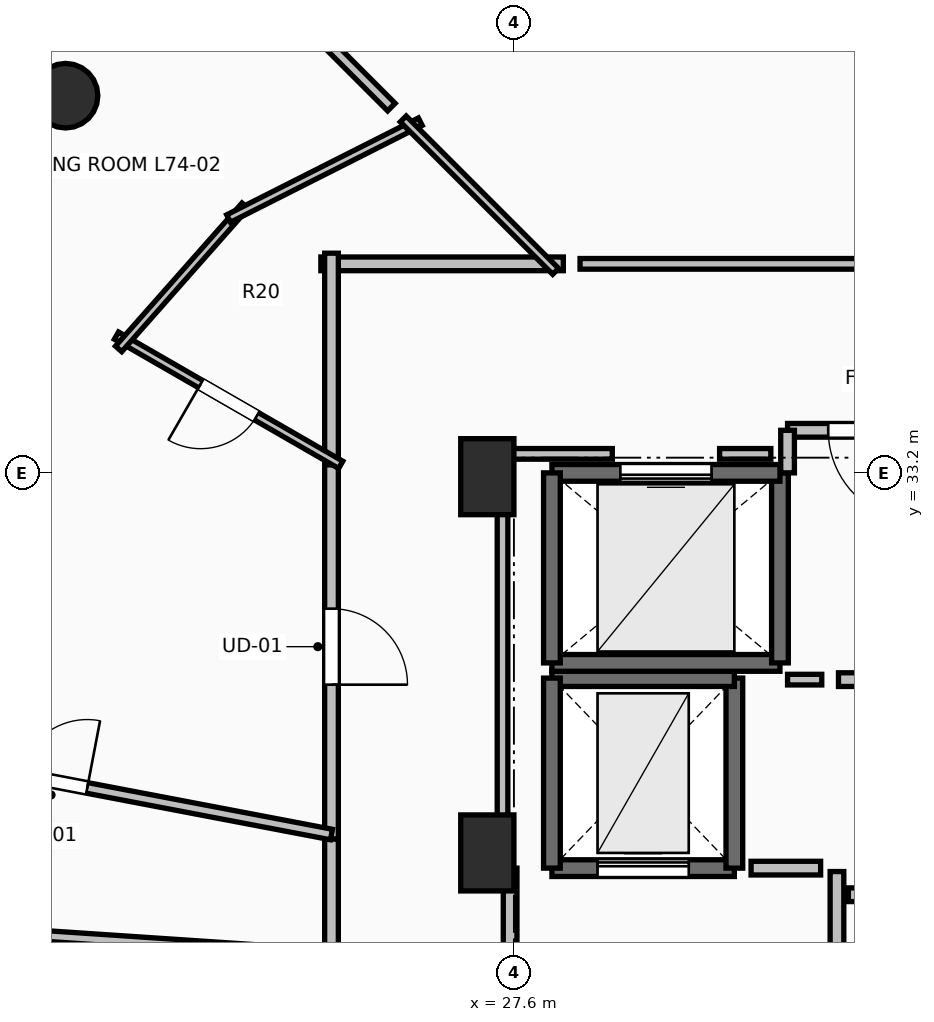
"""IFC4 building model, lengths in metres.
Left out: names, types, materials, properties, quantities, classifications, styles, units other than length and angle.
Written with IfcOpenShell. Run it as: python <this file> out.ifc"""

import sys

from ifc_helpers import new_model, si_unit, direction, frame, frame_2d, origin, origin_2d, place, context, subcontext, project, spatial, rectangle, circle, extrude, element, fill, save


model = new_model("IFC4")
c1 = context("Model", 3, precision=1e-05, world=origin(), true_north=direction((0.0, 1.0)))
c2 = subcontext(c1, "Body", "Model", "MODEL_VIEW")
j1 = project(units=[si_unit("LENGTHUNIT", "METRE"), si_unit("PLANEANGLEUNIT", "RADIAN")], contexts=[c1])
p1 = place(None, origin())
s1 = spatial("IfcSite", under=j1, at=p1, CompositionType="ELEMENT")
p2 = place(p1, origin())
s2 = spatial("IfcBuilding", under=s1, at=p2, CompositionType="ELEMENT")
p3 = place(p2, frame((0.0, 0.0, 273.3)))
s3 = spatial("IfcBuildingStorey", under=s2, at=p3, CompositionType="ELEMENT", Elevation=273.3)
p4 = place(p3, frame((21.701, 38.162, 0.0), z_axis=(0.0, 0.0, 1.0), x_axis=(-0.707106781187, 0.707106781187, 0.0)))
e1 = element("IfcColumn", 1, at=p4, inside=s3, PredefinedType="COLUMN", context=c2, shape_type="SweptSolid", body=[
    extrude(circle(Radius=0.425, at=origin_2d()), origin(), (0.0, 0.0, 1.0), 3.55),
])
for number, where, z_axis, x_axis in (
    (2, (27.25, 28.2, 0.0), (0.0, 0.0, 1.0), (1.0, 0.0, 0.0)),
    (3, (27.25, 33.15, 0.0), (0.0, 0.0, 1.0), (1.0, 0.0, 0.0)),
):
    element("IfcColumn", number, at=place(p3, frame(where, z_axis=z_axis, x_axis=x_axis)), inside=s3, PredefinedType="PILASTER", context=c2, shape_type="SweptSolid", body=[
        extrude(rectangle(XDim=0.7, YDim=1.0, at=origin_2d()), origin(), (0.0, 0.0, 1.0), 3.55),
    ])
p5 = place(p3, frame((28.1, 28.0, 0.0), z_axis=(0.0, 0.0, 1.0), x_axis=(1.0, 0.0, 0.0)))
e4 = element("IfcWall", 4, at=p5, inside=s3, PredefinedType="SHEAR", context=c2, shape_type="SweptSolid", body=[
    extrude(rectangle(XDim=2.4, YDim=0.22, at=frame_2d((1.2, 0.0))), origin(), (0.0, 0.0, 1.0), 3.29),
])
p6 = place(p5, frame((0.6, 0.0, 0.0)))
e5 = element("IfcOpeningElement", 5, at=p6, cuts=e4, PredefinedType="OPENING", context=c2, shape_type="SweptSolid", body=[
    extrude(rectangle(XDim=1.2, YDim=2.2, at=frame_2d((0.6, 1.1))), frame((0.0, 0.125, 0.0), z_axis=(0.0, -1.0, 0.0), x_axis=(1.0, 0.0, 0.0)), (0.0, 0.0, 1.0), 0.25),
])
p7 = place(p3, frame((30.5, 28.0, 0.0), z_axis=(0.0, 0.0, 1.0), x_axis=(0.0, 1.0, 0.0)))
e6 = element("IfcWall", 6, at=p7, inside=s3, PredefinedType="SHEAR", context=c2, shape_type="SweptSolid", body=[
    extrude(rectangle(XDim=2.5, YDim=0.22, at=frame_2d((1.25, 0.0))), origin(), (0.0, 0.0, 1.0), 3.29),
])
p8 = place(p3, frame((30.5, 30.5, 0.0), z_axis=(0.0, 0.0, 1.0), x_axis=(-1.0, 0.0, 0.0)))
e7 = element("IfcWall", 7, at=p8, inside=s3, PredefinedType="SHEAR", context=c2, shape_type="SweptSolid", body=[
    extrude(rectangle(XDim=2.4, YDim=0.22, at=frame_2d((1.2, 0.0))), origin(), (0.0, 0.0, 1.0), 3.29),
])
p9 = place(p3, frame((28.1, 30.5, 0.0), z_axis=(0.0, 0.0, 1.0), x_axis=(0.0, -1.0, 0.0)))
e8 = element("IfcWall", 8, at=p9, inside=s3, PredefinedType="SHEAR", context=c2, shape_type="SweptSolid", body=[
    extrude(rectangle(XDim=2.5, YDim=0.22, at=frame_2d((1.25, 0.0))), origin(), (0.0, 0.0, 1.0), 3.29),
])
p10 = place(p3, frame((28.1, 30.7, 0.0), z_axis=(0.0, 0.0, 1.0), x_axis=(1.0, 0.0, 0.0)))
e9 = element("IfcWall", 9, at=p10, inside=s3, PredefinedType="SOLIDWALL", context=c2, shape_type="SweptSolid", body=[
    extrude(rectangle(XDim=3.0, YDim=0.22, at=frame_2d((1.5, 0.0))), origin(), (0.0, 0.0, 1.0), 3.29),
])
p11 = place(p3, frame((31.1, 30.7, 0.0), z_axis=(0.0, 0.0, 1.0), x_axis=(0.0, 1.0, 0.0)))
e10 = element("IfcWall", 10, at=p11, inside=s3, PredefinedType="SOLIDWALL", context=c2, shape_type="SweptSolid", body=[
    extrude(rectangle(XDim=2.5, YDim=0.22, at=frame_2d((1.25, 0.0))), origin(), (0.0, 0.0, 1.0), 3.29),
])
p12 = place(p3, frame((31.1, 33.2, 0.0), z_axis=(0.0, 0.0, 1.0), x_axis=(-1.0, 0.0, 0.0)))
e11 = element("IfcWall", 11, at=p12, inside=s3, PredefinedType="SOLIDWALL", context=c2, shape_type="SweptSolid", body=[
    extrude(rectangle(XDim=3.0, YDim=0.22, at=frame_2d((1.5, 0.0))), origin(), (0.0, 0.0, 1.0), 3.29),
])
p13 = place(p12, frame((0.9, 0.0, 0.0)))
e12 = element("IfcOpeningElement", 12, at=p13, cuts=e11, PredefinedType="OPENING", context=c2, shape_type="SweptSolid", body=[
    extrude(rectangle(XDim=1.2, YDim=2.2, at=frame_2d((0.6, 1.1))), frame((0.0, 0.125, 0.0), z_axis=(0.0, -1.0, 0.0), x_axis=(1.0, 0.0, 0.0)), (0.0, 0.0, 1.0), 0.25),
])
p14 = place(p3, frame((28.1, 33.2, 0.0), z_axis=(0.0, 0.0, 1.0), x_axis=(0.0, -1.0, 0.0)))
e13 = element("IfcWall", 13, at=p14, inside=s3, PredefinedType="SOLIDWALL", context=c2, shape_type="SweptSolid", body=[
    extrude(rectangle(XDim=2.5, YDim=0.22, at=frame_2d((1.25, 0.0))), origin(), (0.0, 0.0, 1.0), 3.29),
])
p15 = place(p3, frame((31.85, 24.045, 0.0), z_axis=(0.0, 0.0, 1.0), x_axis=(0.0, 1.0, 0.0)))
e14 = element("IfcWall", 14, at=p15, inside=s3, PredefinedType="PARTITIONING", context=c2, shape_type="SweptSolid", body=[
    extrude(rectangle(XDim=3.91, YDim=0.18, at=frame_2d((1.955, 0.0))), origin(), (0.0, 0.0, 1.0), 3.29),
])
p16 = place(p15, frame((1.355, 0.0, 0.0)))
e15 = element("IfcOpeningElement", 15, at=p16, cuts=e14, PredefinedType="OPENING", context=c2, shape_type="SweptSolid", body=[
    extrude(rectangle(XDim=1.2, YDim=2.15, at=frame_2d((0.6, 1.075))), frame((0.0, 0.105, 0.0), z_axis=(0.0, -1.0, 0.0), x_axis=(1.0, 0.0, 0.0)), (0.0, 0.0, 1.0), 0.21),
])
p17 = place(p3, frame((27.55, 28.0, 0.0), z_axis=(0.0, 0.0, 1.0), x_axis=(0.0, -1.0, 0.0)))
e16 = element("IfcWall", 16, at=p17, inside=s3, PredefinedType="PARTITIONING", context=c2, shape_type="SweptSolid", body=[
    extrude(rectangle(XDim=4.05, YDim=0.18, at=frame_2d((2.025, 0.0))), origin(), (0.0, 0.0, 1.0), 3.29),
])
p18 = place(p17, frame((1.425, 0.0, 0.0)))
e17 = element("IfcOpeningElement", 17, at=p18, cuts=e16, PredefinedType="OPENING", context=c2, shape_type="SweptSolid", body=[
    extrude(rectangle(XDim=1.2, YDim=2.15, at=frame_2d((0.6, 1.075))), frame((0.0, 0.105, 0.0), z_axis=(0.0, -1.0, 0.0), x_axis=(1.0, 0.0, 0.0)), (0.0, 0.0, 1.0), 0.21),
])
p19 = place(p3, frame((31.87, 30.48, 0.0), z_axis=(0.0, 0.0, 1.0), x_axis=(1.0, 0.0, 0.0)))
e18 = element("IfcWall", 18, at=p19, inside=s3, PredefinedType="PARTITIONING", context=c2, shape_type="SweptSolid", body=[
    extrude(rectangle(XDim=1.6, YDim=0.18, at=frame_2d((0.8, 0.0))), origin(), (0.0, 0.0, 1.0), 3.29),
])
p20 = place(p3, frame((33.47, 33.76, 0.0), z_axis=(0.0, 0.0, 1.0), x_axis=(-1.0, 0.0, 0.0)))
e19 = element("IfcWall", 19, at=p20, inside=s3, PredefinedType="PARTITIONING", context=c2, shape_type="SweptSolid", body=[
    extrude(rectangle(XDim=2.27, YDim=0.18, at=frame_2d((1.135, 0.0))), origin(), (0.0, 0.0, 1.0), 3.29),
])
p21 = place(p20, frame((0.535, 0.0, 0.0)))
e20 = element("IfcOpeningElement", 20, at=p21, cuts=e19, PredefinedType="OPENING", context=c2, shape_type="SweptSolid", body=[
    extrude(rectangle(XDim=1.2, YDim=2.15, at=frame_2d((0.6, 1.075))), frame((0.0, 0.105, 0.0), z_axis=(0.0, -1.0, 0.0), x_axis=(1.0, 0.0, 0.0)), (0.0, 0.0, 1.0), 0.21),
])
p22 = place(p3, frame((31.2, 33.76, 0.0), z_axis=(0.0, 0.0, 1.0), x_axis=(0.0, -1.0, 0.0)))
e21 = element("IfcWall", 21, at=p22, inside=s3, PredefinedType="PARTITIONING", context=c2, shape_type="SweptSolid", body=[
    extrude(rectangle(XDim=0.56, YDim=0.18, at=frame_2d((0.28, 0.0))), origin(), (0.0, 0.0, 1.0), 3.29),
])
p23 = place(p3, frame((35.04, 27.65, 0.0), z_axis=(0.0, 0.0, 1.0), x_axis=(-1.0, 0.0, 0.0)))
e22 = element("IfcWall", 22, at=p23, inside=s3, PredefinedType="PARTITIONING", context=c2, shape_type="SweptSolid", body=[
    extrude(rectangle(XDim=3.04, YDim=0.18, at=frame_2d((1.52, 0.0))), origin(), (0.0, 0.0, 1.0), 3.29),
])
p24 = place(p23, frame((1.02, 0.0, 0.0)))
e23 = element("IfcOpeningElement", 23, at=p24, cuts=e22, PredefinedType="OPENING", context=c2, shape_type="SweptSolid", body=[
    extrude(rectangle(XDim=1.0, YDim=2.15, at=frame_2d((0.5, 1.075))), frame((0.0, 0.105, 0.0), z_axis=(0.0, -1.0, 0.0), x_axis=(1.0, 0.0, 0.0)), (0.0, 0.0, 1.0), 0.21),
])
p25 = place(p3, frame((25.2, 33.445, 0.0), z_axis=(0.0, 0.0, 1.0), x_axis=(0.0, -1.0, 0.0)))
e24 = element("IfcWall", 24, at=p25, inside=s3, PredefinedType="PARTITIONING", context=c2, shape_type="SweptSolid", body=[
    extrude(rectangle(XDim=5.063, YDim=0.18, at=frame_2d((2.531, 0.0))), origin(), (0.0, 0.0, 1.0), 2.482),
])
p26 = place(p25, frame((2.031, 0.0, 0.0)))
e25 = element("IfcOpeningElement", 25, at=p26, cuts=e24, PredefinedType="OPENING", context=c2, shape_type="SweptSolid", body=[
    extrude(rectangle(XDim=1.0, YDim=2.15, at=frame_2d((0.5, 1.075))), frame((0.0, 0.105, 0.0), z_axis=(0.0, -1.0, 0.0), x_axis=(1.0, 0.0, 0.0)), (0.0, 0.0, 1.0), 0.21),
])
p27 = place(p3, frame((28.25, 35.95, 0.0), z_axis=(0.0, 0.0, 1.0), x_axis=(-1.0, 0.0, 0.0)))
e26 = element("IfcWall", 26, at=p27, inside=s3, PredefinedType="PARTITIONING", context=c2, shape_type="SweptSolid", body=[
    extrude(rectangle(XDim=3.19, YDim=0.18, at=frame_2d((1.595, 0.0))), origin(), (0.0, 0.0, 1.0), 2.482),
])
p28 = place(p3, frame((25.2, 36.09, 0.0), z_axis=(0.0, 0.0, 1.0), x_axis=(0.0, -1.0, 0.0)))
e27 = element("IfcWall", 27, at=p28, inside=s3, PredefinedType="PARTITIONING", context=c2, shape_type="SweptSolid", body=[
    extrude(rectangle(XDim=2.785, YDim=0.18, at=frame_2d((1.393, 0.0))), origin(), (0.0, 0.0, 1.0), 2.482),
])
p29 = place(p3, frame((25.2, 28.382, 0.0), z_axis=(0.0, 0.0, 1.0), x_axis=(0.0, -1.0, 0.0)))
e28 = element("IfcWall", 28, at=p29, inside=s3, PredefinedType="PARTITIONING", context=c2, shape_type="SweptSolid", body=[
    extrude(rectangle(XDim=1.586, YDim=0.18, at=frame_2d((0.793, 0.0))), origin(), (0.0, 0.0, 1.0), 2.482),
])
p30 = place(p3, frame((25.321, 33.306, 0.0), z_axis=(0.0, 0.0, 1.0), x_axis=(-0.866517217622, 0.49914718427, 0.0)))
e29 = element("IfcWall", 29, at=p30, inside=s3, PredefinedType="PARTITIONING", context=c2, shape_type="SweptSolid", body=[
    extrude(rectangle(XDim=3.405, YDim=0.11, at=frame_2d((1.703, 0.0))), origin(), (0.0, 0.0, 1.0), 2.924),
])
p31 = place(p30, frame((1.278, 0.0, 0.0)))
e30 = element("IfcOpeningElement", 30, at=p31, cuts=e29, PredefinedType="OPENING", context=c2, shape_type="SweptSolid", body=[
    extrude(rectangle(XDim=0.85, YDim=2.1, at=frame_2d((0.425, 1.05))), frame((0.0, 0.07, 0.0), z_axis=(0.0, -1.0, 0.0), x_axis=(1.0, 0.0, 0.0)), (0.0, 0.0, 1.0), 0.14),
])
p32 = place(p3, frame((22.399, 34.831, 0.0), z_axis=(0.0, 0.0, 1.0), x_axis=(0.662292938072, 0.749244996099, 0.0)))
e31 = element("IfcWall", 31, at=p32, inside=s3, PredefinedType="PARTITIONING", context=c2, shape_type="SweptSolid", body=[
    extrude(rectangle(XDim=2.513, YDim=0.11, at=frame_2d((1.256, 0.0))), origin(), (0.0, 0.0, 1.0), 2.482),
])
p33 = place(p3, frame((23.846, 36.546, 0.0), z_axis=(0.0, 0.0, 1.0), x_axis=(0.892553076465, 0.450942352959, 0.0)))
e32 = element("IfcWall", 32, at=p33, inside=s3, PredefinedType="PARTITIONING", context=c2, shape_type="SweptSolid", body=[
    extrude(rectangle(XDim=2.826, YDim=0.11, at=frame_2d((1.413, 0.0))), origin(), (0.0, 0.0, 1.0), 2.482),
])
p34 = place(p3, frame((26.144, 37.856, 0.0), z_axis=(0.0, 0.0, 1.0), x_axis=(0.707106781187, -0.707106781187, 0.0)))
e33 = element("IfcWall", 33, at=p34, inside=s3, PredefinedType="PARTITIONING", context=c2, shape_type="SweptSolid", body=[
    extrude(rectangle(XDim=2.835, YDim=0.11, at=frame_2d((1.418, 0.0))), origin(), (0.0, 0.0, 1.0), 2.482),
])
p35 = place(p3, frame((17.889, 29.837, 0.0), z_axis=(0.0, 0.0, 1.0), x_axis=(0.982284262094, -0.187396980877, 0.0)))
e34 = element("IfcWall", 34, at=p35, inside=s3, PredefinedType="PARTITIONING", context=c2, shape_type="SweptSolid", body=[
    extrude(rectangle(XDim=7.443, YDim=0.14, at=frame_2d((3.721, 0.0))), origin(), (0.0, 0.0, 1.0), 2.924),
])
p36 = place(p35, frame((3.271, 0.0, 0.0)))
e35 = element("IfcOpeningElement", 35, at=p36, cuts=e34, PredefinedType="OPENING", context=c2, shape_type="SweptSolid", body=[
    extrude(rectangle(XDim=0.9, YDim=2.1, at=frame_2d((0.45, 1.05))), frame((0.0, 0.085, 0.0), z_axis=(0.0, -1.0, 0.0), x_axis=(1.0, 0.0, 0.0)), (0.0, 0.0, 1.0), 0.17),
])
p37 = place(p3, frame((12.027, 27.737, 0.0), z_axis=(0.0, 0.0, 1.0), x_axis=(0.997770487114, -0.066738707243, 0.0)))
e36 = element("IfcWall", 36, at=p37, inside=s3, PredefinedType="PARTITIONING", context=c2, shape_type="SweptSolid", body=[
    extrude(rectangle(XDim=13.202, YDim=0.14, at=frame_2d((6.601, 0.0))), origin(), (0.0, 0.0, 1.0), 2.482),
])
p38 = place(p3, frame((31.635, 28.0, 0.0), z_axis=(0.0, 0.0, 1.0), x_axis=(-1.0, 0.0, 0.0)))
e37 = element("IfcWall", 37, at=p38, inside=s3, PredefinedType="PARTITIONING", context=c2, shape_type="SweptSolid", body=[
    extrude(rectangle(XDim=0.915, YDim=0.18, at=frame_2d((0.458, 0.0))), origin(), (0.0, 0.0, 1.0), 3.29),
])
p39 = place(p3, frame((31.2, 30.48, 0.0), z_axis=(0.0, 0.0, 1.0), x_axis=(1.0, 0.0, 0.0)))
e38 = element("IfcWall", 38, at=p39, inside=s3, PredefinedType="PARTITIONING", context=c2, shape_type="SweptSolid", body=[
    extrude(rectangle(XDim=0.45, YDim=0.14, at=frame_2d((0.225, 0.0))), origin(), (0.0, 0.0, 1.0), 3.29),
])
p40 = place(p3, frame((36.55, 35.95, 0.0), z_axis=(0.0, 0.0, 1.0), x_axis=(-1.0, 0.0, 0.0)))
e39 = element("IfcWall", 39, at=p40, inside=s3, PredefinedType="PARTITIONING", context=c2, shape_type="SweptSolid", body=[
    extrude(rectangle(XDim=8.08, YDim=0.14, at=frame_2d((4.04, 0.0))), origin(), (0.0, 0.0, 1.0), 2.482),
])
p41 = place(p3, frame((30.98, 33.45, 0.0), z_axis=(0.0, 0.0, 1.0), x_axis=(-1.0, 0.0, 0.0)))
e40 = element("IfcWall", 40, at=p41, inside=s3, PredefinedType="PARTITIONING", context=c2, shape_type="SweptSolid", body=[
    extrude(rectangle(XDim=0.674, YDim=0.14, at=frame_2d((0.337, 0.0))), origin(), (0.0, 0.0, 1.0), 3.29),
])
p42 = place(p3, frame((28.894, 33.45, 0.0), z_axis=(0.0, 0.0, 1.0), x_axis=(-1.0, 0.0, 0.0)))
e41 = element("IfcWall", 41, at=p42, inside=s3, PredefinedType="PARTITIONING", context=c2, shape_type="SweptSolid", body=[
    extrude(rectangle(XDim=1.444, YDim=0.14, at=frame_2d((0.722, 0.0))), origin(), (0.0, 0.0, 1.0), 2.482),
])
p43 = place(p3, frame((27.45, 33.45, 0.0), z_axis=(0.0, 0.0, 1.0), x_axis=(0.0, -1.0, 0.0)))
e42 = element("IfcWall", 42, at=p43, inside=s3, PredefinedType="PARTITIONING", context=c2, shape_type="SweptSolid", body=[
    extrude(rectangle(XDim=5.254, YDim=0.14, at=frame_2d((2.627, 0.0))), origin(), (0.0, 0.0, 1.0), 2.482),
])
p44 = place(p3, frame((25.988, 38.012, 0.0), z_axis=(0.0, 0.0, 1.0), x_axis=(-0.707106781187, 0.707106781187, 0.0)))
e43 = element("IfcWall", 43, at=p44, inside=s3, PredefinedType="PARTITIONING", context=c2, shape_type="SweptSolid", body=[
    extrude(rectangle(XDim=5.043, YDim=0.14, at=frame_2d((2.521, 0.0))), origin(), (0.0, 0.0, 1.0), 2.874),
])
p45 = place(p6, origin())
e44 = element("IfcDoor", 44, at=p45, inside=s3, OperationType="SLIDING_TO_LEFT", PredefinedType="DOOR", context=c2, shape_type="SweptSolid", body=[
    extrude(rectangle(XDim=1.2, YDim=2.2, at=frame_2d((0.6, 1.1))), frame((0.0, 0.025, 0.0), z_axis=(0.0, -1.0, 0.0), x_axis=(1.0, 0.0, 0.0)), (0.0, 0.0, 1.0), 0.05),
])
fill(e5, e44)
p46 = place(p13, origin())
e45 = element("IfcDoor", 45, at=p46, inside=s3, OperationType="SLIDING_TO_LEFT", PredefinedType="DOOR", context=c2, shape_type="SweptSolid", body=[
    extrude(rectangle(XDim=1.2, YDim=2.2, at=frame_2d((0.6, 1.1))), frame((0.0, 0.025, 0.0), z_axis=(0.0, -1.0, 0.0), x_axis=(1.0, 0.0, 0.0)), (0.0, 0.0, 1.0), 0.05),
])
fill(e12, e45)
p47 = place(p21, origin())
e46 = element("IfcDoor", 46, at=p47, inside=s3, OperationType="SINGLE_SWING_LEFT", PredefinedType="DOOR", context=c2, shape_type="SweptSolid", body=[
    extrude(rectangle(XDim=1.2, YDim=2.15, at=frame_2d((0.6, 1.075))), frame((0.0, 0.025, 0.0), z_axis=(0.0, -1.0, 0.0), x_axis=(1.0, 0.0, 0.0)), (0.0, 0.0, 1.0), 0.05),
])
fill(e20, e46)
p48 = place(p26, origin())
e47 = element("IfcDoor", 47, at=p48, inside=s3, OperationType="SINGLE_SWING_RIGHT", PredefinedType="DOOR", context=c2, shape_type="SweptSolid", body=[
    extrude(rectangle(XDim=1.0, YDim=2.15, at=frame_2d((0.5, 1.075))), frame((0.0, 0.025, 0.0), z_axis=(0.0, -1.0, 0.0), x_axis=(1.0, 0.0, 0.0)), (0.0, 0.0, 1.0), 0.05),
])
fill(e25, e47)
p49 = place(p31, origin())
e48 = element("IfcDoor", 48, at=p49, inside=s3, OperationType="SINGLE_SWING_RIGHT", PredefinedType="DOOR", context=c2, shape_type="SweptSolid", body=[
    extrude(rectangle(XDim=0.85, YDim=2.1, at=frame_2d((0.425, 1.05))), frame((0.0, 0.025, 0.0), z_axis=(0.0, -1.0, 0.0), x_axis=(1.0, 0.0, 0.0)), (0.0, 0.0, 1.0), 0.05),
])
fill(e30, e48)
p50 = place(p36, origin())
e49 = element("IfcDoor", 49, at=p50, inside=s3, OperationType="SINGLE_SWING_RIGHT", PredefinedType="DOOR", context=c2, shape_type="SweptSolid", body=[
    extrude(rectangle(XDim=0.9, YDim=2.1, at=frame_2d((0.45, 1.05))), frame((0.0, 0.025, 0.0), z_axis=(0.0, -1.0, 0.0), x_axis=(1.0, 0.0, 0.0)), (0.0, 0.0, 1.0), 0.05),
])
fill(e35, e49)
save(model, sys.argv[1])
